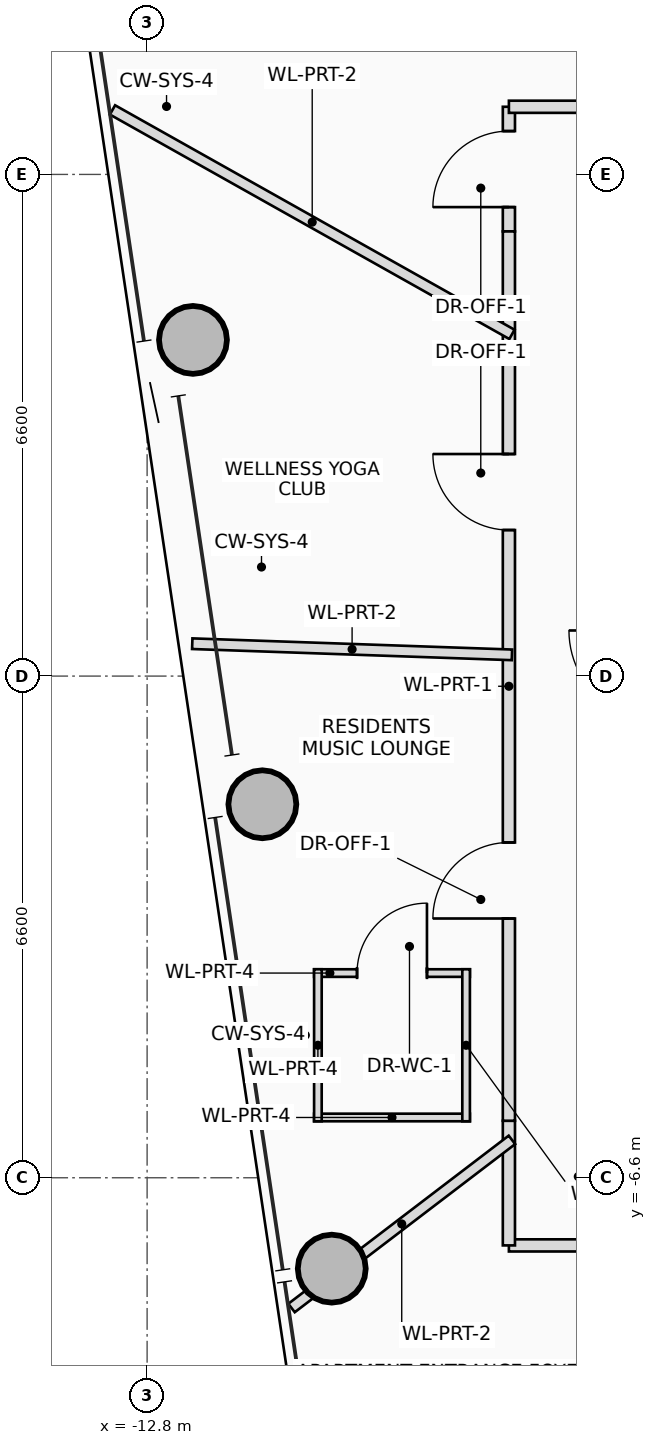
"""IFC4 building model, lengths in metres.
Left out: names, types, materials, properties, quantities, classifications, styles, units other than length and angle.
Written with IfcOpenShell. Run it as: python <this file> out.ifc"""

import sys

from ifc_helpers import new_model, si_unit, direction, frame, frame_2d, origin, origin_2d, place, context, subcontext, project, spatial, rectangle, hollow_circle, extrude, source, transform, mapped, element, fill, save


model = new_model("IFC4")
c1 = context("Model", 3, precision=1e-05, world=origin(), true_north=direction((0.0, 1.0)))
c2 = subcontext(c1, "Body", "Model", "MODEL_VIEW")
j1 = project(units=[si_unit("LENGTHUNIT", "METRE"), si_unit("PLANEANGLEUNIT", "RADIAN")], contexts=[c1])
p1 = place(None, origin())
s1 = spatial("IfcSite", under=j1, at=p1, CompositionType="ELEMENT")
p2 = place(p1, origin())
s2 = spatial("IfcBuilding", under=s1, at=p2, CompositionType="ELEMENT")
p3 = place(p2, frame((0.0, 0.0, 260.95)))
s3 = spatial("IfcBuildingStorey", under=s2, at=p3, CompositionType="ELEMENT", Elevation=260.95)
m1 = source(origin(), c2, "Body", "SweptSolid", [
    extrude(hollow_circle(Radius=0.45, WallThickness=0.032, at=origin_2d()), origin(), (0.0, 0.0, 1.0), 3.4),
])
for number, where, z_axis, x_axis in (
    (1, (-12.197, 4.423, 0.0), (0.0, 0.0, 1.0), (1.0, 0.0, 0.0)),
    (2, (-11.284, -1.686, 0.0), (0.0, 0.0, 1.0), (1.0, 0.0, 0.0)),
    (3, (-10.371, -7.796, 0.0), (0.0, 0.0, 1.0), (1.0, 0.0, 0.0)),
):
    element("IfcColumn", number, at=place(p3, frame(where, z_axis=z_axis, x_axis=x_axis)), inside=s3, PredefinedType="COLUMN", context=c2, shape_type="MappedRepresentation", body=[
        mapped(m1, transform((0.0, 0.0, 0.0), scale=1.0)),
    ])
p4 = place(p3, frame((-10.603, -3.907, 0.0), z_axis=(0.0, 0.0, 1.0), x_axis=(1.0, 0.0, 0.0)))
e4 = element("IfcWall", 4, at=p4, inside=s3, PredefinedType="PARTITIONING", context=c2, shape_type="SweptSolid", body=[
    extrude(rectangle(XDim=2.05, YDim=0.1, at=frame_2d((1.025, 0.0))), origin(), (0.0, 0.0, 1.0), 2.805),
])
p5 = place(p4, frame((0.565, 0.0, 0.0)))
e5 = element("IfcOpeningElement", 5, at=p5, cuts=e4, PredefinedType="OPENING", context=c2, shape_type="SweptSolid", body=[
    extrude(rectangle(XDim=0.92, YDim=2.1, at=frame_2d((0.46, 1.05))), frame((0.0, 0.06, 0.0), z_axis=(0.0, -1.0, 0.0), x_axis=(1.0, 0.0, 0.0)), (0.0, 0.0, 1.0), 0.12),
])
p6 = place(p3, frame((-8.553, -5.807, 0.0), z_axis=(0.0, 0.0, 1.0), x_axis=(-1.0, 0.0, 0.0)))
e6 = element("IfcWall", 6, at=p6, inside=s3, PredefinedType="PARTITIONING", context=c2, shape_type="SweptSolid", body=[
    extrude(rectangle(XDim=2.05, YDim=0.1, at=frame_2d((1.025, 0.0))), origin(), (0.0, 0.0, 1.0), 2.765),
])
p7 = place(p3, frame((-8.603, -3.857, 0.0), z_axis=(0.0, 0.0, 1.0), x_axis=(0.0, -1.0, 0.0)))
e7 = element("IfcWall", 7, at=p7, inside=s3, PredefinedType="PARTITIONING", context=c2, shape_type="SweptSolid", body=[
    extrude(rectangle(XDim=2.0, YDim=0.1, at=frame_2d((1.0, 0.0))), origin(), (0.0, 0.0, 1.0), 2.805),
])
p8 = place(p3, frame((-10.553, -5.857, 0.0), z_axis=(0.0, 0.0, 1.0), x_axis=(0.0, 1.0, 0.0)))
e8 = element("IfcWall", 8, at=p8, inside=s3, PredefinedType="PARTITIONING", context=c2, shape_type="SweptSolid", body=[
    extrude(rectangle(XDim=2.0, YDim=0.1, at=frame_2d((1.0, 0.0))), origin(), (0.0, 0.0, 1.0), 2.765),
])
p9 = place(p3, frame((-8.04, 5.85, 0.0), z_axis=(0.0, 0.0, 1.0), x_axis=(0.0, 1.0, 0.0)))
e9 = element("IfcWall", 9, at=p9, inside=s3, PredefinedType="PARTITIONING", context=c2, shape_type="SweptSolid", body=[
    extrude(rectangle(XDim=1.64, YDim=0.16, at=frame_2d((0.82, 0.0))), origin(), (0.0, 0.0, 1.0), 2.605),
])
p10 = place(p9, frame((0.32, 0.0, 0.0)))
e10 = element("IfcOpeningElement", 10, at=p10, cuts=e9, PredefinedType="OPENING", context=c2, shape_type="SweptSolid", body=[
    extrude(rectangle(XDim=1.0, YDim=2.25, at=frame_2d((0.5, 1.125))), frame((0.0, 0.09, 0.0), z_axis=(0.0, -1.0, 0.0), x_axis=(1.0, 0.0, 0.0)), (0.0, 0.0, 1.0), 0.18),
])
for number, where, z_axis, x_axis in (
    (11, (-8.04, 7.49, 0.0), (0.0, 0.0, 1.0), (1.0, 0.0, 0.0)),
    (12, (-6.36, -7.49, 0.0), (0.0, 0.0, 1.0), (-1.0, 0.0, 0.0)),
):
    element("IfcWall", number, at=place(p3, frame(where, z_axis=z_axis, x_axis=x_axis)), inside=s3, PredefinedType="PARTITIONING", context=c2, shape_type="SweptSolid", body=[
        extrude(rectangle(XDim=1.68, YDim=0.16, at=frame_2d((0.84, 0.0))), origin(), (0.0, 0.0, 1.0), 2.605),
    ])
p11 = place(p3, frame((-8.04, -7.49, 0.0), z_axis=(0.0, 0.0, 1.0), x_axis=(0.0, 1.0, 0.0)))
e13 = element("IfcWall", 13, at=p11, inside=s3, PredefinedType="PARTITIONING", context=c2, shape_type="SweptSolid", body=[
    extrude(rectangle(XDim=1.64, YDim=0.16, at=frame_2d((0.82, 0.0))), origin(), (0.0, 0.0, 1.0), 2.605),
])
p12 = place(p3, frame((-8.04, -5.85, 0.0), z_axis=(0.0, 0.0, 1.0), x_axis=(0.0, 1.0, 0.0)))
e14 = element("IfcWall", 14, at=p12, inside=s3, PredefinedType="PARTITIONING", context=c2, shape_type="SweptSolid", body=[
    extrude(rectangle(XDim=11.7, YDim=0.16, at=frame_2d((5.85, 0.0))), origin(), (0.0, 0.0, 1.0), 2.605),
])
p13 = place(p12, frame((2.661, 0.0, 0.0)))
e15 = element("IfcOpeningElement", 15, at=p13, cuts=e14, PredefinedType="OPENING", context=c2, shape_type="SweptSolid", body=[
    extrude(rectangle(XDim=1.0, YDim=2.25, at=frame_2d((0.5, 1.125))), frame((0.0, 0.09, 0.0), z_axis=(0.0, -1.0, 0.0), x_axis=(1.0, 0.0, 0.0)), (0.0, 0.0, 1.0), 0.18),
])
p14 = place(p12, frame((7.771, 0.0, 0.0)))
e16 = element("IfcOpeningElement", 16, at=p14, cuts=e14, PredefinedType="OPENING", context=c2, shape_type="SweptSolid", body=[
    extrude(rectangle(XDim=1.0, YDim=2.25, at=frame_2d((0.5, 1.125))), frame((0.0, 0.09, 0.0), z_axis=(0.0, -1.0, 0.0), x_axis=(1.0, 0.0, 0.0)), (0.0, 0.0, 1.0), 0.18),
])
p15 = place(p3, frame((-8.0, 4.496, 0.0), z_axis=(0.0, 0.0, 1.0), x_axis=(-0.871799326596, 0.489863179008, 0.0)))
e17 = element("IfcWall", 17, at=p15, inside=s3, PredefinedType="PARTITIONING", context=c2, shape_type="SweptSolid", body=[
    extrude(rectangle(XDim=6.029, YDim=0.14, at=frame_2d((3.014, 0.0))), origin(), (0.0, 0.0, 1.0), 2.605),
])
p16 = place(p3, frame((-8.0, 0.279, 0.0), z_axis=(0.0, 0.0, 1.0), x_axis=(-0.999390047844, 0.034921802229, 0.0)))
e18 = element("IfcWall", 18, at=p16, inside=s3, PredefinedType="PARTITIONING", context=c2, shape_type="SweptSolid", body=[
    extrude(rectangle(XDim=4.209, YDim=0.14, at=frame_2d((2.104, 0.0))), origin(), (0.0, 0.0, 1.0), 2.765),
])
p17 = place(p3, frame((-8.0, -6.102, 0.0), z_axis=(0.0, 0.0, 1.0), x_axis=(-0.795138118829, -0.606428373335, 0.0)))
e19 = element("IfcWall", 19, at=p17, inside=s3, PredefinedType="PARTITIONING", context=c2, shape_type="SweptSolid", body=[
    extrude(rectangle(XDim=3.647, YDim=0.14, at=frame_2d((1.823, 0.0))), origin(), (0.0, 0.0, 1.0), 2.605),
])
p18 = place(p5, origin())
e20 = element("IfcDoor", 20, at=p18, inside=s3, OperationType="SINGLE_SWING_RIGHT", PredefinedType="DOOR", context=c2, shape_type="SweptSolid", body=[
    extrude(rectangle(XDim=0.92, YDim=2.1, at=frame_2d((0.46, 1.05))), frame((0.0, 0.025, 0.0), z_axis=(0.0, -1.0, 0.0), x_axis=(1.0, 0.0, 0.0)), (0.0, 0.0, 1.0), 0.05),
])
fill(e5, e20)
p19 = place(p10, origin())
e21 = element("IfcDoor", 21, at=p19, inside=s3, OperationType="SINGLE_SWING_LEFT", PredefinedType="DOOR", context=c2, shape_type="SweptSolid", body=[
    extrude(rectangle(XDim=1.0, YDim=2.25, at=frame_2d((0.5, 1.125))), frame((0.0, 0.025, 0.0), z_axis=(0.0, -1.0, 0.0), x_axis=(1.0, 0.0, 0.0)), (0.0, 0.0, 1.0), 0.05),
])
fill(e10, e21)
p20 = place(p13, origin())
e22 = element("IfcDoor", 22, at=p20, inside=s3, OperationType="SINGLE_SWING_LEFT", PredefinedType="DOOR", context=c2, shape_type="SweptSolid", body=[
    extrude(rectangle(XDim=1.0, YDim=2.25, at=frame_2d((0.5, 1.125))), frame((0.0, 0.025, 0.0), z_axis=(0.0, -1.0, 0.0), x_axis=(1.0, 0.0, 0.0)), (0.0, 0.0, 1.0), 0.05),
])
fill(e15, e22)
p21 = place(p14, origin())
e23 = element("IfcDoor", 23, at=p21, inside=s3, OperationType="SINGLE_SWING_RIGHT", PredefinedType="DOOR", context=c2, shape_type="SweptSolid", body=[
    extrude(rectangle(XDim=1.0, YDim=2.25, at=frame_2d((0.5, 1.125))), frame((0.0, 0.025, 0.0), z_axis=(0.0, -1.0, 0.0), x_axis=(1.0, 0.0, 0.0)), (0.0, 0.0, 1.0), 0.05),
])
fill(e16, e23)
save(model, sys.argv[1])
